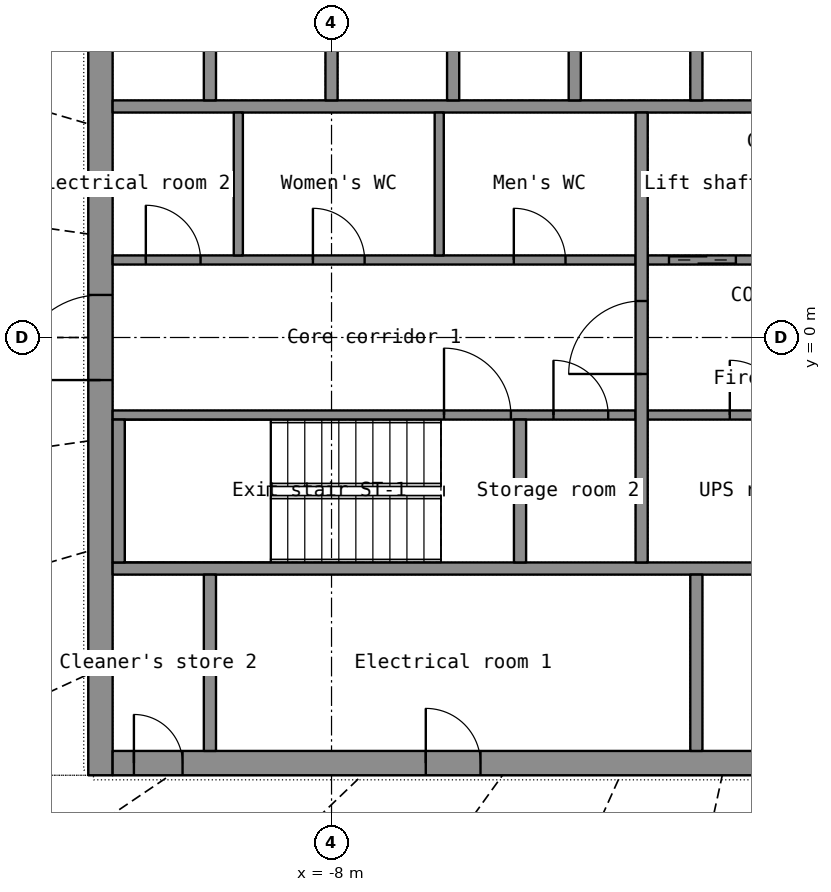
"""IFC4 building model, lengths in metres.
Left out: names, types, materials, properties, quantities, classifications, styles, units other than length and angle.
Written with IfcOpenShell. Run it as: python <this file> out.ifc"""

import sys

from ifc_helpers import new_model, si_unit, direction, frame, frame_2d, origin, place, context, subcontext, project, spatial, rectangle, extrude, element, fill, save


model = new_model("IFC4")
c1 = context("Model", 3, precision=1e-05, world=origin(), true_north=direction((0.0, 1.0)))
c2 = subcontext(c1, "Body", "Model", "MODEL_VIEW")
j1 = project(units=[si_unit("LENGTHUNIT", "METRE"), si_unit("PLANEANGLEUNIT", "RADIAN")], contexts=[c1])
p1 = place(None, origin())
s1 = spatial("IfcSite", under=j1, at=p1, CompositionType="ELEMENT")
p2 = place(p1, origin())
s2 = spatial("IfcBuilding", under=s1, at=p2, CompositionType="ELEMENT")
p3 = place(p2, frame((0.0, 0.0, 217.1)))
s3 = spatial("IfcBuildingStorey", under=s2, at=p3, CompositionType="ELEMENT", Elevation=217.1)
p4 = place(p3, frame((-11.8, -7.2, 0.0), z_axis=(0.0, 0.0, 1.0), x_axis=(0.0, 1.0, 0.0)))
e1 = element("IfcWall", 1, at=p4, inside=s3, PredefinedType="SHEAR", context=c2, shape_type="SweptSolid", body=[
    extrude(rectangle(XDim=14.4, YDim=0.4, at=frame_2d((7.2, 0.0))), origin(), (0.0, 0.0, 1.0), 3.3),
])
p5 = place(p4, frame((6.5, 0.0, 0.0)))
e2 = element("IfcOpeningElement", 2, at=p5, cuts=e1, PredefinedType="OPENING", context=c2, shape_type="SweptSolid", body=[
    extrude(rectangle(XDim=1.4, YDim=2.2, at=frame_2d((0.7, 1.1))), frame((0.0, 0.21, 0.0), z_axis=(0.0, -1.0, 0.0), x_axis=(1.0, 0.0, 0.0)), (0.0, 0.0, 1.0), 0.42),
])
p6 = place(p3, frame((-11.6, -7.0, 0.0), z_axis=(0.0, 0.0, 1.0), x_axis=(1.0, 0.0, 0.0)))
e3 = element("IfcWall", 3, at=p6, inside=s3, PredefinedType="SHEAR", context=c2, shape_type="SweptSolid", body=[
    extrude(rectangle(XDim=23.2, YDim=0.4, at=frame_2d((11.6, 0.0))), origin(), (0.0, 0.0, 1.0), 3.3),
])
p7 = place(p6, frame((20.05, 0.0, 0.0)))
e4 = element("IfcOpeningElement", 4, at=p7, cuts=e3, PredefinedType="OPENING", context=c2, shape_type="SweptSolid", body=[
    extrude(rectangle(XDim=1.1, YDim=2.2, at=frame_2d((0.55, 1.1))), frame((0.0, 0.21, 0.0), z_axis=(0.0, -1.0, 0.0), x_axis=(1.0, 0.0, 0.0)), (0.0, 0.0, 1.0), 0.42),
])
p8 = place(p6, frame((5.15, 0.0, 0.0)))
e5 = element("IfcOpeningElement", 5, at=p8, cuts=e3, PredefinedType="OPENING", context=c2, shape_type="SweptSolid", body=[
    extrude(rectangle(XDim=0.9, YDim=2.1, at=frame_2d((0.45, 1.05))), frame((0.0, 0.21, 0.0), z_axis=(0.0, -1.0, 0.0), x_axis=(1.0, 0.0, 0.0)), (0.0, 0.0, 1.0), 0.42),
])
p9 = place(p6, frame((12.15, 0.0, 0.0)))
e6 = element("IfcOpeningElement", 6, at=p9, cuts=e3, PredefinedType="OPENING", context=c2, shape_type="SweptSolid", body=[
    extrude(rectangle(XDim=0.9, YDim=2.1, at=frame_2d((0.45, 1.05))), frame((0.0, 0.21, 0.0), z_axis=(0.0, -1.0, 0.0), x_axis=(1.0, 0.0, 0.0)), (0.0, 0.0, 1.0), 0.42),
])
p10 = place(p6, frame((17.15, 0.0, 0.0)))
e7 = element("IfcOpeningElement", 7, at=p10, cuts=e3, PredefinedType="OPENING", context=c2, shape_type="SweptSolid", body=[
    extrude(rectangle(XDim=0.9, YDim=2.1, at=frame_2d((0.45, 1.05))), frame((0.0, 0.21, 0.0), z_axis=(0.0, -1.0, 0.0), x_axis=(1.0, 0.0, 0.0)), (0.0, 0.0, 1.0), 0.42),
])
p11 = place(p6, frame((0.35, 0.0, 0.0)))
e8 = element("IfcOpeningElement", 8, at=p11, cuts=e3, PredefinedType="OPENING", context=c2, shape_type="SweptSolid", body=[
    extrude(rectangle(XDim=0.8, YDim=2.05, at=frame_2d((0.4, 1.025))), frame((0.0, 0.21, 0.0), z_axis=(0.0, -1.0, 0.0), x_axis=(1.0, 0.0, 0.0)), (0.0, 0.0, 1.0), 0.42),
])
p12 = place(p6, frame((22.05, 0.0, 0.0)))
e9 = element("IfcOpeningElement", 9, at=p12, cuts=e3, PredefinedType="OPENING", context=c2, shape_type="SweptSolid", body=[
    extrude(rectangle(XDim=0.8, YDim=2.05, at=frame_2d((0.4, 1.025))), frame((0.0, 0.21, 0.0), z_axis=(0.0, -1.0, 0.0), x_axis=(1.0, 0.0, 0.0)), (0.0, 0.0, 1.0), 0.42),
])
for number, where, z_axis, x_axis in (
    (10, (-11.6, -3.8, 0.0), (0.0, 0.0, 1.0), (1.0, 0.0, 0.0)),
    (11, (-11.6, 3.8, 0.0), (0.0, 0.0, 1.0), (1.0, 0.0, 0.0)),
):
    element("IfcWall", number, at=place(p3, frame(where, z_axis=z_axis, x_axis=x_axis)), inside=s3, PredefinedType="SHEAR", context=c2, shape_type="SweptSolid", body=[
        extrude(rectangle(XDim=23.2, YDim=0.2, at=frame_2d((11.6, 0.0))), origin(), (0.0, 0.0, 1.0), 3.3),
    ])
p13 = place(p3, frame((-10.0, -6.8, 0.0), z_axis=(0.0, 0.0, 1.0), x_axis=(0.0, 1.0, 0.0)))
e12 = element("IfcWall", 12, at=p13, inside=s3, PredefinedType="SHEAR", context=c2, shape_type="SweptSolid", body=[
    extrude(rectangle(XDim=2.9, YDim=0.2, at=frame_2d((1.45, 0.0))), origin(), (0.0, 0.0, 1.0), 3.3),
])
p14 = place(p3, frame((-2.0, -6.8, 0.0), z_axis=(0.0, 0.0, 1.0), x_axis=(0.0, 1.0, 0.0)))
e13 = element("IfcWall", 13, at=p14, inside=s3, PredefinedType="PARTITIONING", context=c2, shape_type="SweptSolid", body=[
    extrude(rectangle(XDim=2.9, YDim=0.2, at=frame_2d((1.45, 0.0))), origin(), (0.0, 0.0, 1.0), 3.3),
])
for number, where, z_axis, x_axis in (
    (14, (-10.0, 3.9, 0.0), (0.0, 0.0, 1.0), (0.0, 1.0, 0.0)),
    (15, (-8.0, 3.9, 0.0), (0.0, 0.0, 1.0), (0.0, 1.0, 0.0)),
    (16, (-6.0, 3.9, 0.0), (0.0, 0.0, 1.0), (0.0, 1.0, 0.0)),
    (17, (-4.0, 3.9, 0.0), (0.0, 0.0, 1.0), (0.0, 1.0, 0.0)),
    (18, (-2.0, 3.9, 0.0), (0.0, 0.0, 1.0), (0.0, 1.0, 0.0)),
):
    element("IfcWall", number, at=place(p3, frame(where, z_axis=z_axis, x_axis=x_axis)), inside=s3, PredefinedType="SHEAR", context=c2, shape_type="SweptSolid", body=[
        extrude(rectangle(XDim=2.9, YDim=0.2, at=frame_2d((1.45, 0.0))), origin(), (0.0, 0.0, 1.0), 3.3),
    ])
p15 = place(p3, frame((-11.6, -1.275, 0.0), z_axis=(0.0, 0.0, 1.0), x_axis=(1.0, 0.0, 0.0)))
e19 = element("IfcWall", 19, at=p15, inside=s3, PredefinedType="SHEAR", context=c2, shape_type="SweptSolid", body=[
    extrude(rectangle(XDim=8.6, YDim=0.15, at=frame_2d((4.3, 0.0))), origin(), (0.0, 0.0, 1.0), 3.3),
])
p16 = place(p15, frame((5.45, 0.0, 0.0)))
e20 = element("IfcOpeningElement", 20, at=p16, cuts=e19, PredefinedType="OPENING", context=c2, shape_type="SweptSolid", body=[
    extrude(rectangle(XDim=1.1, YDim=2.15, at=frame_2d((0.55, 1.075))), frame((0.0, 0.085, 0.0), z_axis=(0.0, -1.0, 0.0), x_axis=(1.0, 0.0, 0.0)), (0.0, 0.0, 1.0), 0.17),
])
p17 = place(p15, frame((7.25, 0.0, 0.0)))
e21 = element("IfcOpeningElement", 21, at=p17, cuts=e19, PredefinedType="OPENING", context=c2, shape_type="SweptSolid", body=[
    extrude(rectangle(XDim=0.9, YDim=2.1, at=frame_2d((0.45, 1.05))), frame((0.0, 0.085, 0.0), z_axis=(0.0, -1.0, 0.0), x_axis=(1.0, 0.0, 0.0)), (0.0, 0.0, 1.0), 0.17),
])
p18 = place(p3, frame((-2.8, -1.275, 0.0), z_axis=(0.0, 0.0, 1.0), x_axis=(1.0, 0.0, 0.0)))
e22 = element("IfcWall", 22, at=p18, inside=s3, PredefinedType="SHEAR", context=c2, shape_type="SweptSolid", body=[
    extrude(rectangle(XDim=5.6, YDim=0.15, at=frame_2d((2.8, 0.0))), origin(), (0.0, 0.0, 1.0), 3.3),
])
p19 = place(p18, frame((4.15, 0.0, 0.0)))
e23 = element("IfcOpeningElement", 23, at=p19, cuts=e22, PredefinedType="OPENING", context=c2, shape_type="SweptSolid", body=[
    extrude(rectangle(XDim=1.1, YDim=2.2, at=frame_2d((0.55, 1.1))), frame((0.0, 0.085, 0.0), z_axis=(0.0, -1.0, 0.0), x_axis=(1.0, 0.0, 0.0)), (0.0, 0.0, 1.0), 0.17),
])
p20 = place(p18, frame((1.35, 0.0, 0.0)))
e24 = element("IfcOpeningElement", 24, at=p20, cuts=e22, PredefinedType="OPENING", context=c2, shape_type="SweptSolid", body=[
    extrude(rectangle(XDim=0.9, YDim=2.1, at=frame_2d((0.45, 1.05))), frame((0.0, 0.085, 0.0), z_axis=(0.0, -1.0, 0.0), x_axis=(1.0, 0.0, 0.0)), (0.0, 0.0, 1.0), 0.17),
])
p21 = place(p3, frame((-11.6, 1.275, 0.0), z_axis=(0.0, 0.0, 1.0), x_axis=(1.0, 0.0, 0.0)))
e25 = element("IfcWall", 25, at=p21, inside=s3, PredefinedType="PARTITIONING", context=c2, shape_type="SweptSolid", body=[
    extrude(rectangle(XDim=8.6, YDim=0.15, at=frame_2d((4.3, 0.0))), origin(), (0.0, 0.0, 1.0), 3.3),
])
p22 = place(p21, frame((0.546, 0.0, 0.0)))
e26 = element("IfcOpeningElement", 26, at=p22, cuts=e25, PredefinedType="OPENING", context=c2, shape_type="SweptSolid", body=[
    extrude(rectangle(XDim=0.9, YDim=2.1, at=frame_2d((0.45, 1.05))), frame((0.0, 0.085, 0.0), z_axis=(0.0, -1.0, 0.0), x_axis=(1.0, 0.0, 0.0)), (0.0, 0.0, 1.0), 0.17),
])
p23 = place(p21, frame((3.294, 0.0, 0.0)))
e27 = element("IfcOpeningElement", 27, at=p23, cuts=e25, PredefinedType="OPENING", context=c2, shape_type="SweptSolid", body=[
    extrude(rectangle(XDim=0.85, YDim=2.1, at=frame_2d((0.425, 1.05))), frame((0.0, 0.085, 0.0), z_axis=(0.0, -1.0, 0.0), x_axis=(1.0, 0.0, 0.0)), (0.0, 0.0, 1.0), 0.17),
])
p24 = place(p21, frame((6.598, 0.0, 0.0)))
e28 = element("IfcOpeningElement", 28, at=p24, cuts=e25, PredefinedType="OPENING", context=c2, shape_type="SweptSolid", body=[
    extrude(rectangle(XDim=0.85, YDim=2.1, at=frame_2d((0.425, 1.05))), frame((0.0, 0.085, 0.0), z_axis=(0.0, -1.0, 0.0), x_axis=(1.0, 0.0, 0.0)), (0.0, 0.0, 1.0), 0.17),
])
p25 = place(p3, frame((-2.8, 1.275, 0.0), z_axis=(0.0, 0.0, 1.0), x_axis=(1.0, 0.0, 0.0)))
e29 = element("IfcWall", 29, at=p25, inside=s3, PredefinedType="SHEAR", context=c2, shape_type="SweptSolid", body=[
    extrude(rectangle(XDim=5.6, YDim=0.15, at=frame_2d((2.8, 0.0))), origin(), (0.0, 0.0, 1.0), 3.3),
])
p26 = place(p25, frame((0.35, 0.0, 0.0)))
e30 = element("IfcOpeningElement", 30, at=p26, cuts=e29, PredefinedType="OPENING", context=c2, shape_type="SweptSolid", body=[
    extrude(rectangle(XDim=1.1, YDim=2.2, at=frame_2d((0.55, 1.1))), frame((0.0, 0.085, 0.0), z_axis=(0.0, -1.0, 0.0), x_axis=(1.0, 0.0, 0.0)), (0.0, 0.0, 1.0), 0.17),
])
p27 = place(p25, frame((2.326, 0.0, 0.0)))
e31 = element("IfcOpeningElement", 31, at=p27, cuts=e29, PredefinedType="OPENING", context=c2, shape_type="SweptSolid", body=[
    extrude(rectangle(XDim=0.9, YDim=2.1, at=frame_2d((0.45, 1.05))), frame((0.0, 0.085, 0.0), z_axis=(0.0, -1.0, 0.0), x_axis=(1.0, 0.0, 0.0)), (0.0, 0.0, 1.0), 0.17),
])
p28 = place(p25, frame((4.201, 0.0, 0.0)))
e32 = element("IfcOpeningElement", 32, at=p28, cuts=e29, PredefinedType="OPENING", context=c2, shape_type="SweptSolid", body=[
    extrude(rectangle(XDim=0.9, YDim=2.1, at=frame_2d((0.45, 1.05))), frame((0.0, 0.085, 0.0), z_axis=(0.0, -1.0, 0.0), x_axis=(1.0, 0.0, 0.0)), (0.0, 0.0, 1.0), 0.17),
])
p29 = place(p3, frame((-2.9, -3.7, 0.0), z_axis=(0.0, 0.0, 1.0), x_axis=(0.0, 1.0, 0.0)))
e33 = element("IfcWall", 33, at=p29, inside=s3, PredefinedType="SHEAR", context=c2, shape_type="SweptSolid", body=[
    extrude(rectangle(XDim=7.4, YDim=0.2, at=frame_2d((3.7, 0.0))), origin(), (0.0, 0.0, 1.0), 3.3),
])
p30 = place(p29, frame((3.1, 0.0, 0.0)))
e34 = element("IfcOpeningElement", 34, at=p30, cuts=e33, PredefinedType="OPENING", context=c2, shape_type="SweptSolid", body=[
    extrude(rectangle(XDim=1.2, YDim=2.2, at=frame_2d((0.6, 1.1))), frame((0.0, 0.11, 0.0), z_axis=(0.0, -1.0, 0.0), x_axis=(1.0, 0.0, 0.0)), (0.0, 0.0, 1.0), 0.22),
])
for number, where, z_axis, x_axis in (
    (35, (-11.5, -3.7, 0.0), (0.0, 0.0, 1.0), (0.0, 1.0, 0.0)),
    (36, (-4.9, -3.7, 0.0), (0.0, 0.0, 1.0), (0.0, 1.0, 0.0)),
):
    element("IfcWall", number, at=place(p3, frame(where, z_axis=z_axis, x_axis=x_axis)), inside=s3, PredefinedType="SHEAR", context=c2, shape_type="SweptSolid", body=[
        extrude(rectangle(XDim=2.35, YDim=0.2, at=frame_2d((1.175, 0.0))), origin(), (0.0, 0.0, 1.0), 3.3),
    ])
for number, where, z_axis, x_axis in (
    (37, (-9.533, 1.35, 0.0), (0.0, 0.0, 1.0), (0.0, 1.0, 0.0)),
    (38, (-6.229, 1.35, 0.0), (0.0, 0.0, 1.0), (0.0, 1.0, 0.0)),
):
    element("IfcWall", number, at=place(p3, frame(where, z_axis=z_axis, x_axis=x_axis)), inside=s3, PredefinedType="PARTITIONING", context=c2, shape_type="SweptSolid", body=[
        extrude(rectangle(XDim=2.35, YDim=0.15, at=frame_2d((1.175, 0.0))), origin(), (0.0, 0.0, 1.0), 3.3),
    ])
p31 = place(p8, origin())
e39 = element("IfcDoor", 39, at=p31, inside=s3, OperationType="SINGLE_SWING_LEFT", PredefinedType="DOOR", context=c2, shape_type="SweptSolid", body=[
    extrude(rectangle(XDim=0.9, YDim=2.1, at=frame_2d((0.45, 1.05))), frame((0.0, 0.025, 0.0), z_axis=(0.0, -1.0, 0.0), x_axis=(1.0, 0.0, 0.0)), (0.0, 0.0, 1.0), 0.05),
])
fill(e5, e39)
p32 = place(p11, origin())
e40 = element("IfcDoor", 40, at=p32, inside=s3, OperationType="SINGLE_SWING_LEFT", PredefinedType="DOOR", context=c2, shape_type="SweptSolid", body=[
    extrude(rectangle(XDim=0.8, YDim=2.05, at=frame_2d((0.4, 1.025))), frame((0.0, 0.025, 0.0), z_axis=(0.0, -1.0, 0.0), x_axis=(1.0, 0.0, 0.0)), (0.0, 0.0, 1.0), 0.05),
])
fill(e8, e40)
p33 = place(p5, origin())
e41 = element("IfcDoor", 41, at=p33, inside=s3, OperationType="DOUBLE_DOOR_SINGLE_SWING", PredefinedType="DOOR", context=c2, shape_type="SweptSolid", body=[
    extrude(rectangle(XDim=1.4, YDim=2.2, at=frame_2d((0.7, 1.1))), frame((0.0, 0.025, 0.0), z_axis=(0.0, -1.0, 0.0), x_axis=(1.0, 0.0, 0.0)), (0.0, 0.0, 1.0), 0.05),
])
fill(e2, e41)
p34 = place(p30, origin())
e42 = element("IfcDoor", 42, at=p34, inside=s3, OperationType="SINGLE_SWING_LEFT", PredefinedType="DOOR", context=c2, shape_type="SweptSolid", body=[
    extrude(rectangle(XDim=1.2, YDim=2.2, at=frame_2d((0.6, 1.1))), frame((0.0, 0.025, 0.0), z_axis=(0.0, -1.0, 0.0), x_axis=(1.0, 0.0, 0.0)), (0.0, 0.0, 1.0), 0.05),
])
fill(e34, e42)
p35 = place(p26, origin())
e43 = element("IfcDoor", 43, at=p35, inside=s3, OperationType="DOUBLE_DOOR_SLIDING", PredefinedType="DOOR", context=c2, shape_type="SweptSolid", body=[
    extrude(rectangle(XDim=1.1, YDim=2.2, at=frame_2d((0.55, 1.1))), frame((0.0, 0.025, 0.0), z_axis=(0.0, -1.0, 0.0), x_axis=(1.0, 0.0, 0.0)), (0.0, 0.0, 1.0), 0.05),
])
fill(e30, e43)
p36 = place(p16, origin())
e44 = element("IfcDoor", 44, at=p36, inside=s3, OperationType="SINGLE_SWING_LEFT", PredefinedType="DOOR", context=c2, shape_type="SweptSolid", body=[
    extrude(rectangle(XDim=1.1, YDim=2.15, at=frame_2d((0.55, 1.075))), frame((0.0, 0.025, 0.0), z_axis=(0.0, -1.0, 0.0), x_axis=(1.0, 0.0, 0.0)), (0.0, 0.0, 1.0), 0.05),
])
fill(e20, e44)
p37 = place(p22, origin())
e45 = element("IfcDoor", 45, at=p37, inside=s3, OperationType="SINGLE_SWING_LEFT", PredefinedType="DOOR", context=c2, shape_type="SweptSolid", body=[
    extrude(rectangle(XDim=0.9, YDim=2.1, at=frame_2d((0.45, 1.05))), frame((0.0, 0.025, 0.0), z_axis=(0.0, -1.0, 0.0), x_axis=(1.0, 0.0, 0.0)), (0.0, 0.0, 1.0), 0.05),
])
fill(e26, e45)
p38 = place(p23, origin())
e46 = element("IfcDoor", 46, at=p38, inside=s3, OperationType="SINGLE_SWING_LEFT", PredefinedType="DOOR", context=c2, shape_type="SweptSolid", body=[
    extrude(rectangle(XDim=0.85, YDim=2.1, at=frame_2d((0.425, 1.05))), frame((0.0, 0.025, 0.0), z_axis=(0.0, -1.0, 0.0), x_axis=(1.0, 0.0, 0.0)), (0.0, 0.0, 1.0), 0.05),
])
fill(e27, e46)
p39 = place(p24, origin())
e47 = element("IfcDoor", 47, at=p39, inside=s3, OperationType="SINGLE_SWING_LEFT", PredefinedType="DOOR", context=c2, shape_type="SweptSolid", body=[
    extrude(rectangle(XDim=0.85, YDim=2.1, at=frame_2d((0.425, 1.05))), frame((0.0, 0.025, 0.0), z_axis=(0.0, -1.0, 0.0), x_axis=(1.0, 0.0, 0.0)), (0.0, 0.0, 1.0), 0.05),
])
fill(e28, e47)
p40 = place(p20, origin())
e48 = element("IfcDoor", 48, at=p40, inside=s3, OperationType="SINGLE_SWING_LEFT", PredefinedType="DOOR", context=c2, shape_type="SweptSolid", body=[
    extrude(rectangle(XDim=0.9, YDim=2.1, at=frame_2d((0.45, 1.05))), frame((0.0, 0.025, 0.0), z_axis=(0.0, -1.0, 0.0), x_axis=(1.0, 0.0, 0.0)), (0.0, 0.0, 1.0), 0.05),
])
fill(e24, e48)
p41 = place(p17, origin())
e49 = element("IfcDoor", 49, at=p41, inside=s3, OperationType="SINGLE_SWING_LEFT", PredefinedType="DOOR", context=c2, shape_type="SweptSolid", body=[
    extrude(rectangle(XDim=0.9, YDim=2.1, at=frame_2d((0.45, 1.05))), frame((0.0, 0.025, 0.0), z_axis=(0.0, -1.0, 0.0), x_axis=(1.0, 0.0, 0.0)), (0.0, 0.0, 1.0), 0.05),
])
fill(e21, e49)
save(model, sys.argv[1])
